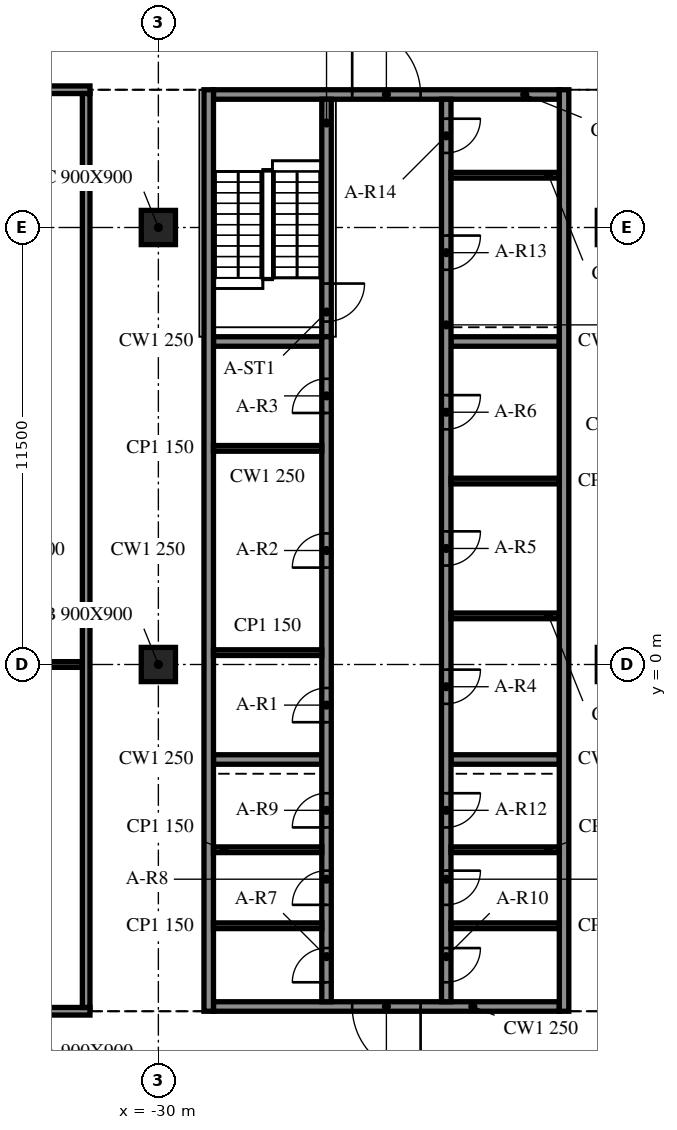
"""IFC4 building model, lengths in metres.
Left out: names, types, materials, properties, quantities, classifications, styles, units other than length and angle.
Written with IfcOpenShell. Run it as: python <this file> out.ifc"""

import sys

from ifc_helpers import new_model, si_unit, direction, frame, frame_2d, origin, origin_2d, place, context, subcontext, project, spatial, rectangle, extrude, element, fill, save


model = new_model("IFC4")
c1 = context("Model", 3, precision=1e-05, world=origin(), true_north=direction((0.0, 1.0)))
c2 = subcontext(c1, "Body", "Model", "MODEL_VIEW")
j1 = project(units=[si_unit("LENGTHUNIT", "METRE"), si_unit("PLANEANGLEUNIT", "RADIAN")], contexts=[c1])
p1 = place(None, origin())
s1 = spatial("IfcSite", under=j1, at=p1, CompositionType="ELEMENT")
p2 = place(p1, origin())
s2 = spatial("IfcBuilding", under=s1, at=p2, CompositionType="ELEMENT")
p3 = place(p2, frame((0.0, 0.0, 282.3)))
s3 = spatial("IfcBuildingStorey", under=s2, at=p3, CompositionType="ELEMENT", Elevation=282.3)
for number, where, z_axis, x_axis in (
    (1, (-30.0, 0.0, -0.34), (0.0, 0.0, 1.0), (1.0, 0.0, 0.0)),
    (2, (-30.0, 11.5, -0.34), (0.0, 0.0, 1.0), (1.0, 0.0, 0.0)),
):
    element("IfcColumn", number, at=place(p3, frame(where, z_axis=z_axis, x_axis=x_axis)), inside=s3, PredefinedType="COLUMN", context=c2, shape_type="SweptSolid", body=[
        extrude(rectangle(XDim=0.9, YDim=0.9, at=origin_2d()), origin(), (0.0, 0.0, 1.0), 7.34),
    ])
for number, where, z_axis, x_axis in (
    (3, (-28.675, 15.125, 0.0), (0.0, 0.0, 1.0), (0.0, -1.0, 0.0)),
    (4, (-19.325, -9.125, 0.0), (0.0, 0.0, 1.0), (0.0, 1.0, 0.0)),
):
    element("IfcWall", number, at=place(p3, frame(where, z_axis=z_axis, x_axis=x_axis)), inside=s3, PredefinedType="SOLIDWALL", context=c2, shape_type="SweptSolid", body=[
        extrude(rectangle(XDim=24.25, YDim=0.25, at=frame_2d((12.125, 0.0))), origin(), (0.0, 0.0, 1.0), 3.46),
    ])
p4 = place(p3, frame((-19.45, -9.0, 0.0), z_axis=(0.0, 0.0, 1.0), x_axis=(-1.0, 0.0, 0.0)))
e5 = element("IfcWall", 5, at=p4, inside=s3, PredefinedType="SOLIDWALL", context=c2, shape_type="SweptSolid", body=[
    extrude(rectangle(XDim=9.1, YDim=0.25, at=frame_2d((4.55, 0.0))), origin(), (0.0, 0.0, 1.0), 3.46),
])
p5 = place(p4, frame((3.65, 0.0, 0.0)))
e6 = element("IfcOpeningElement", 6, at=p5, cuts=e5, PredefinedType="OPENING", context=c2, shape_type="SweptSolid", body=[
    extrude(rectangle(XDim=1.8, YDim=2.1, at=frame_2d((0.9, 1.05))), frame((0.0, 0.135, 0.0), z_axis=(0.0, -1.0, 0.0), x_axis=(1.0, 0.0, 0.0)), (0.0, 0.0, 1.0), 0.27),
])
p6 = place(p3, frame((-28.55, 15.0, 0.0), z_axis=(0.0, 0.0, 1.0), x_axis=(1.0, 0.0, 0.0)))
e7 = element("IfcWall", 7, at=p6, inside=s3, PredefinedType="SOLIDWALL", context=c2, shape_type="SweptSolid", body=[
    extrude(rectangle(XDim=9.1, YDim=0.25, at=frame_2d((4.55, 0.0))), origin(), (0.0, 0.0, 1.0), 3.46),
])
p7 = place(p6, frame((3.65, 0.0, 0.0)))
e8 = element("IfcOpeningElement", 8, at=p7, cuts=e7, PredefinedType="OPENING", context=c2, shape_type="SweptSolid", body=[
    extrude(rectangle(XDim=1.8, YDim=2.1, at=frame_2d((0.9, 1.05))), frame((0.0, 0.135, 0.0), z_axis=(0.0, -1.0, 0.0), x_axis=(1.0, 0.0, 0.0)), (0.0, 0.0, 1.0), 0.27),
])
p8 = place(p3, frame((-25.575, -8.875, 0.0), z_axis=(0.0, 0.0, 1.0), x_axis=(0.0, 1.0, 0.0)))
e9 = element("IfcWall", 9, at=p8, inside=s3, PredefinedType="SOLIDWALL", context=c2, shape_type="SweptSolid", body=[
    extrude(rectangle(XDim=17.5, YDim=0.25, at=frame_2d((8.75, 0.0))), origin(), (0.0, 0.0, 1.0), 3.46),
])
p9 = place(p8, frame((7.356, 0.0, 0.0)))
e10 = element("IfcOpeningElement", 10, at=p9, cuts=e9, PredefinedType="OPENING", context=c2, shape_type="SweptSolid", body=[
    extrude(rectangle(XDim=0.9, YDim=2.1, at=frame_2d((0.45, 1.05))), frame((0.0, 0.135, 0.0), z_axis=(0.0, -1.0, 0.0), x_axis=(1.0, 0.0, 0.0)), (0.0, 0.0, 1.0), 0.27),
])
p10 = place(p8, frame((11.425, 0.0, 0.0)))
e11 = element("IfcOpeningElement", 11, at=p10, cuts=e9, PredefinedType="OPENING", context=c2, shape_type="SweptSolid", body=[
    extrude(rectangle(XDim=0.9, YDim=2.1, at=frame_2d((0.45, 1.05))), frame((0.0, 0.135, 0.0), z_axis=(0.0, -1.0, 0.0), x_axis=(1.0, 0.0, 0.0)), (0.0, 0.0, 1.0), 0.27),
])
p11 = place(p8, frame((15.494, 0.0, 0.0)))
e12 = element("IfcOpeningElement", 12, at=p11, cuts=e9, PredefinedType="OPENING", context=c2, shape_type="SweptSolid", body=[
    extrude(rectangle(XDim=0.9, YDim=2.1, at=frame_2d((0.45, 1.05))), frame((0.0, 0.135, 0.0), z_axis=(0.0, -1.0, 0.0), x_axis=(1.0, 0.0, 0.0)), (0.0, 0.0, 1.0), 0.27),
])
p12 = place(p8, frame((0.512, 0.0, 0.0)))
e13 = element("IfcOpeningElement", 13, at=p12, cuts=e9, PredefinedType="OPENING", context=c2, shape_type="SweptSolid", body=[
    extrude(rectangle(XDim=0.9, YDim=2.1, at=frame_2d((0.45, 1.05))), frame((0.0, 0.135, 0.0), z_axis=(0.0, -1.0, 0.0), x_axis=(1.0, 0.0, 0.0)), (0.0, 0.0, 1.0), 0.27),
])
p13 = place(p8, frame((2.55, 0.0, 0.0)))
e14 = element("IfcOpeningElement", 14, at=p13, cuts=e9, PredefinedType="OPENING", context=c2, shape_type="SweptSolid", body=[
    extrude(rectangle(XDim=0.9, YDim=2.1, at=frame_2d((0.45, 1.05))), frame((0.0, 0.135, 0.0), z_axis=(0.0, -1.0, 0.0), x_axis=(1.0, 0.0, 0.0)), (0.0, 0.0, 1.0), 0.27),
])
p14 = place(p8, frame((4.587, 0.0, 0.0)))
e15 = element("IfcOpeningElement", 15, at=p14, cuts=e9, PredefinedType="OPENING", context=c2, shape_type="SweptSolid", body=[
    extrude(rectangle(XDim=0.9, YDim=2.1, at=frame_2d((0.45, 1.05))), frame((0.0, 0.135, 0.0), z_axis=(0.0, -1.0, 0.0), x_axis=(1.0, 0.0, 0.0)), (0.0, 0.0, 1.0), 0.27),
])
p15 = place(p3, frame((-25.575, 14.875, 0.0), z_axis=(0.0, 0.0, 1.0), x_axis=(0.0, -1.0, 0.0)))
e16 = element("IfcWall", 16, at=p15, inside=s3, PredefinedType="SOLIDWALL", context=c2, shape_type="SweptSolid", body=[
    extrude(rectangle(XDim=6.25, YDim=0.25, at=frame_2d((3.125, 0.0))), origin(), (0.0, 0.0, 1.0), 3.46),
])
p16 = place(p15, frame((4.85, 0.0, 0.0)))
e17 = element("IfcOpeningElement", 17, at=p16, cuts=e16, PredefinedType="OPENING", context=c2, shape_type="SweptSolid", body=[
    extrude(rectangle(XDim=1.0, YDim=2.1, at=frame_2d((0.5, 1.05))), frame((0.0, 0.135, 0.0), z_axis=(0.0, -1.0, 0.0), x_axis=(1.0, 0.0, 0.0)), (0.0, 0.0, 1.0), 0.27),
])
p17 = place(p3, frame((-22.425, 14.875, 0.0), z_axis=(0.0, 0.0, 1.0), x_axis=(0.0, -1.0, 0.0)))
e18 = element("IfcWall", 18, at=p17, inside=s3, PredefinedType="SOLIDWALL", context=c2, shape_type="SweptSolid", body=[
    extrude(rectangle(XDim=23.75, YDim=0.25, at=frame_2d((11.875, 0.0))), origin(), (0.0, 0.0, 1.0), 3.46),
])
p18 = place(p17, frame((15.01, 0.0, 0.0)))
e19 = element("IfcOpeningElement", 19, at=p18, cuts=e18, PredefinedType="OPENING", context=c2, shape_type="SweptSolid", body=[
    extrude(rectangle(XDim=0.9, YDim=2.1, at=frame_2d((0.45, 1.05))), frame((0.0, 0.135, 0.0), z_axis=(0.0, -1.0, 0.0), x_axis=(1.0, 0.0, 0.0)), (0.0, 0.0, 1.0), 0.27),
])
p19 = place(p17, frame((11.371, 0.0, 0.0)))
e20 = element("IfcOpeningElement", 20, at=p19, cuts=e18, PredefinedType="OPENING", context=c2, shape_type="SweptSolid", body=[
    extrude(rectangle(XDim=0.9, YDim=2.1, at=frame_2d((0.45, 1.05))), frame((0.0, 0.135, 0.0), z_axis=(0.0, -1.0, 0.0), x_axis=(1.0, 0.0, 0.0)), (0.0, 0.0, 1.0), 0.27),
])
p20 = place(p17, frame((7.786, 0.0, 0.0)))
e21 = element("IfcOpeningElement", 21, at=p20, cuts=e18, PredefinedType="OPENING", context=c2, shape_type="SweptSolid", body=[
    extrude(rectangle(XDim=0.9, YDim=2.1, at=frame_2d((0.45, 1.05))), frame((0.0, 0.135, 0.0), z_axis=(0.0, -1.0, 0.0), x_axis=(1.0, 0.0, 0.0)), (0.0, 0.0, 1.0), 0.27),
])
p21 = place(p17, frame((22.337, 0.0, 0.0)))
e22 = element("IfcOpeningElement", 22, at=p21, cuts=e18, PredefinedType="OPENING", context=c2, shape_type="SweptSolid", body=[
    extrude(rectangle(XDim=0.9, YDim=2.1, at=frame_2d((0.45, 1.05))), frame((0.0, 0.135, 0.0), z_axis=(0.0, -1.0, 0.0), x_axis=(1.0, 0.0, 0.0)), (0.0, 0.0, 1.0), 0.27),
])
p22 = place(p17, frame((20.3, 0.0, 0.0)))
e23 = element("IfcOpeningElement", 23, at=p22, cuts=e18, PredefinedType="OPENING", context=c2, shape_type="SweptSolid", body=[
    extrude(rectangle(XDim=0.9, YDim=2.1, at=frame_2d((0.45, 1.05))), frame((0.0, 0.135, 0.0), z_axis=(0.0, -1.0, 0.0), x_axis=(1.0, 0.0, 0.0)), (0.0, 0.0, 1.0), 0.27),
])
p23 = place(p17, frame((18.262, 0.0, 0.0)))
e24 = element("IfcOpeningElement", 24, at=p23, cuts=e18, PredefinedType="OPENING", context=c2, shape_type="SweptSolid", body=[
    extrude(rectangle(XDim=0.9, YDim=2.1, at=frame_2d((0.45, 1.05))), frame((0.0, 0.135, 0.0), z_axis=(0.0, -1.0, 0.0), x_axis=(1.0, 0.0, 0.0)), (0.0, 0.0, 1.0), 0.27),
])
p24 = place(p17, frame((3.587, 0.0, 0.0)))
e25 = element("IfcOpeningElement", 25, at=p24, cuts=e18, PredefinedType="OPENING", context=c2, shape_type="SweptSolid", body=[
    extrude(rectangle(XDim=0.9, YDim=2.1, at=frame_2d((0.45, 1.05))), frame((0.0, 0.135, 0.0), z_axis=(0.0, -1.0, 0.0), x_axis=(1.0, 0.0, 0.0)), (0.0, 0.0, 1.0), 0.27),
])
p25 = place(p17, frame((0.512, 0.0, 0.0)))
e26 = element("IfcOpeningElement", 26, at=p25, cuts=e18, PredefinedType="OPENING", context=c2, shape_type="SweptSolid", body=[
    extrude(rectangle(XDim=0.9, YDim=2.1, at=frame_2d((0.45, 1.05))), frame((0.0, 0.135, 0.0), z_axis=(0.0, -1.0, 0.0), x_axis=(1.0, 0.0, 0.0)), (0.0, 0.0, 1.0), 0.27),
])
for number, where, z_axis, x_axis in (
    (27, (-28.55, -2.5, 0.0), (0.0, 0.0, 1.0), (1.0, 0.0, 0.0)),
    (28, (-28.55, 8.5, 0.0), (0.0, 0.0, 1.0), (1.0, 0.0, 0.0)),
    (29, (-22.3, -2.5, 0.0), (0.0, 0.0, 1.0), (1.0, 0.0, 0.0)),
    (30, (-22.3, 8.5, 0.0), (0.0, 0.0, 1.0), (1.0, 0.0, 0.0)),
):
    element("IfcWall", number, at=place(p3, frame(where, z_axis=z_axis, x_axis=x_axis)), inside=s3, PredefinedType="SOLIDWALL", context=c2, shape_type="SweptSolid", body=[
        extrude(rectangle(XDim=2.85, YDim=0.25, at=frame_2d((1.425, 0.0))), origin(), (0.0, 0.0, 1.0), 3.46),
    ])
for number, where, z_axis, x_axis in (
    (31, (-28.55, 0.312, 0.0), (0.0, 0.0, 1.0), (1.0, 0.0, 0.0)),
    (32, (-28.55, 5.688, 0.0), (0.0, 0.0, 1.0), (1.0, 0.0, 0.0)),
    (33, (-22.3, 1.28, 0.0), (0.0, 0.0, 1.0), (1.0, 0.0, 0.0)),
    (34, (-22.3, 4.827, 0.0), (0.0, 0.0, 1.0), (1.0, 0.0, 0.0)),
    (35, (-28.55, -6.875, 0.0), (0.0, 0.0, 1.0), (1.0, 0.0, 0.0)),
    (36, (-28.55, -4.875, 0.0), (0.0, 0.0, 1.0), (1.0, 0.0, 0.0)),
    (37, (-22.3, -6.875, 0.0), (0.0, 0.0, 1.0), (1.0, 0.0, 0.0)),
    (38, (-22.3, -4.875, 0.0), (0.0, 0.0, 1.0), (1.0, 0.0, 0.0)),
    (39, (-22.3, 12.875, 0.0), (0.0, 0.0, 1.0), (1.0, 0.0, 0.0)),
):
    element("IfcWall", number, at=place(p3, frame(where, z_axis=z_axis, x_axis=x_axis)), inside=s3, PredefinedType="PARTITIONING", context=c2, shape_type="SweptSolid", body=[
        extrude(rectangle(XDim=2.85, YDim=0.15, at=frame_2d((1.425, 0.0))), origin(), (0.0, 0.0, 1.0), 3.46),
    ])
p26 = place(p3, frame((-47.014, -9.125, 0.0), z_axis=(0.0, 0.0, 1.0), x_axis=(1.0, 0.0, 0.0)))
e40 = element("IfcWall", 40, at=p26, inside=s3, PredefinedType="PARTITIONING", context=c2, shape_type="SweptSolid", body=[
    extrude(rectangle(XDim=15.214, YDim=0.2, at=frame_2d((7.607, 0.0))), origin(), (0.0, 0.0, 1.0), 3.4),
])
p27 = place(p26, frame((7.1, 0.0, 0.0)))
e41 = element("IfcOpeningElement", 41, at=p27, cuts=e40, PredefinedType="OPENING", context=c2, shape_type="SweptSolid", body=[
    extrude(rectangle(XDim=1.2, YDim=2.1, at=frame_2d((0.6, 1.05))), frame((0.0, 0.11, 0.0), z_axis=(0.0, -1.0, 0.0), x_axis=(1.0, 0.0, 0.0)), (0.0, 0.0, 1.0), 0.22),
])
p28 = place(p3, frame((-41.55, 0.0, 0.0), z_axis=(0.0, 0.0, 1.0), x_axis=(1.0, 0.0, 0.0)))
e42 = element("IfcWall", 42, at=p28, inside=s3, PredefinedType="PARTITIONING", context=c2, shape_type="SweptSolid", body=[
    extrude(rectangle(XDim=9.55, YDim=0.15, at=frame_2d((4.775, 0.0))), origin(), (0.0, 0.0, 1.0), 3.4),
])
p29 = place(p3, frame((-47.975, 15.125, 0.0), z_axis=(0.0, 0.0, 1.0), x_axis=(1.0, 0.0, 0.0)))
e43 = element("IfcWall", 43, at=p29, inside=s3, PredefinedType="PARTITIONING", context=c2, shape_type="SweptSolid", body=[
    extrude(rectangle(XDim=16.175, YDim=0.2, at=frame_2d((8.087, 0.0))), origin(), (0.0, 0.0, 1.0), 3.4),
])
p30 = place(p29, frame((7.5, 0.0, 0.0)))
e44 = element("IfcOpeningElement", 44, at=p30, cuts=e43, PredefinedType="OPENING", context=c2, shape_type="SweptSolid", body=[
    extrude(rectangle(XDim=1.2, YDim=2.1, at=frame_2d((0.6, 1.05))), frame((0.0, 0.11, 0.0), z_axis=(0.0, -1.0, 0.0), x_axis=(1.0, 0.0, 0.0)), (0.0, 0.0, 1.0), 0.22),
])
p31 = place(p3, frame((-31.9, -9.025, 0.0), z_axis=(0.0, 0.0, 1.0), x_axis=(0.0, 1.0, 0.0)))
e45 = element("IfcWall", 45, at=p31, inside=s3, PredefinedType="PARTITIONING", context=c2, shape_type="SweptSolid", body=[
    extrude(rectangle(XDim=24.05, YDim=0.2, at=frame_2d((12.025, 0.0))), origin(), (0.0, 0.0, 1.0), 3.4),
])
p32 = place(p5, origin())
e46 = element("IfcDoor", 46, at=p32, inside=s3, OperationType="DOUBLE_DOOR_SINGLE_SWING", PredefinedType="DOOR", context=c2, shape_type="SweptSolid", body=[
    extrude(rectangle(XDim=1.8, YDim=2.1, at=frame_2d((0.9, 1.05))), frame((0.0, 0.025, 0.0), z_axis=(0.0, -1.0, 0.0), x_axis=(1.0, 0.0, 0.0)), (0.0, 0.0, 1.0), 0.05),
])
fill(e6, e46)
p33 = place(p7, origin())
e47 = element("IfcDoor", 47, at=p33, inside=s3, OperationType="DOUBLE_DOOR_SINGLE_SWING", PredefinedType="DOOR", context=c2, shape_type="SweptSolid", body=[
    extrude(rectangle(XDim=1.8, YDim=2.1, at=frame_2d((0.9, 1.05))), frame((0.0, 0.025, 0.0), z_axis=(0.0, -1.0, 0.0), x_axis=(1.0, 0.0, 0.0)), (0.0, 0.0, 1.0), 0.05),
])
fill(e8, e47)
p34 = place(p9, origin())
e48 = element("IfcDoor", 48, at=p34, inside=s3, OperationType="SINGLE_SWING_LEFT", PredefinedType="DOOR", context=c2, shape_type="SweptSolid", body=[
    extrude(rectangle(XDim=0.9, YDim=2.1, at=frame_2d((0.45, 1.05))), frame((0.0, 0.025, 0.0), z_axis=(0.0, -1.0, 0.0), x_axis=(1.0, 0.0, 0.0)), (0.0, 0.0, 1.0), 0.05),
])
fill(e10, e48)
p35 = place(p10, origin())
e49 = element("IfcDoor", 49, at=p35, inside=s3, OperationType="SINGLE_SWING_RIGHT", PredefinedType="DOOR", context=c2, shape_type="SweptSolid", body=[
    extrude(rectangle(XDim=0.9, YDim=2.1, at=frame_2d((0.45, 1.05))), frame((0.0, 0.025, 0.0), z_axis=(0.0, -1.0, 0.0), x_axis=(1.0, 0.0, 0.0)), (0.0, 0.0, 1.0), 0.05),
])
fill(e11, e49)
p36 = place(p11, origin())
e50 = element("IfcDoor", 50, at=p36, inside=s3, OperationType="SINGLE_SWING_LEFT", PredefinedType="DOOR", context=c2, shape_type="SweptSolid", body=[
    extrude(rectangle(XDim=0.9, YDim=2.1, at=frame_2d((0.45, 1.05))), frame((0.0, 0.025, 0.0), z_axis=(0.0, -1.0, 0.0), x_axis=(1.0, 0.0, 0.0)), (0.0, 0.0, 1.0), 0.05),
])
fill(e12, e50)
p37 = place(p18, origin())
e51 = element("IfcDoor", 51, at=p37, inside=s3, OperationType="SINGLE_SWING_RIGHT", PredefinedType="DOOR", context=c2, shape_type="SweptSolid", body=[
    extrude(rectangle(XDim=0.9, YDim=2.1, at=frame_2d((0.45, 1.05))), frame((0.0, 0.025, 0.0), z_axis=(0.0, -1.0, 0.0), x_axis=(1.0, 0.0, 0.0)), (0.0, 0.0, 1.0), 0.05),
])
fill(e19, e51)
p38 = place(p19, origin())
e52 = element("IfcDoor", 52, at=p38, inside=s3, OperationType="SINGLE_SWING_LEFT", PredefinedType="DOOR", context=c2, shape_type="SweptSolid", body=[
    extrude(rectangle(XDim=0.9, YDim=2.1, at=frame_2d((0.45, 1.05))), frame((0.0, 0.025, 0.0), z_axis=(0.0, -1.0, 0.0), x_axis=(1.0, 0.0, 0.0)), (0.0, 0.0, 1.0), 0.05),
])
fill(e20, e52)
p39 = place(p20, origin())
e53 = element("IfcDoor", 53, at=p39, inside=s3, OperationType="SINGLE_SWING_RIGHT", PredefinedType="DOOR", context=c2, shape_type="SweptSolid", body=[
    extrude(rectangle(XDim=0.9, YDim=2.1, at=frame_2d((0.45, 1.05))), frame((0.0, 0.025, 0.0), z_axis=(0.0, -1.0, 0.0), x_axis=(1.0, 0.0, 0.0)), (0.0, 0.0, 1.0), 0.05),
])
fill(e21, e53)
p40 = place(p12, origin())
e54 = element("IfcDoor", 54, at=p40, inside=s3, OperationType="SINGLE_SWING_LEFT", PredefinedType="DOOR", context=c2, shape_type="SweptSolid", body=[
    extrude(rectangle(XDim=0.9, YDim=2.1, at=frame_2d((0.45, 1.05))), frame((0.0, 0.025, 0.0), z_axis=(0.0, -1.0, 0.0), x_axis=(1.0, 0.0, 0.0)), (0.0, 0.0, 1.0), 0.05),
])
fill(e13, e54)
p41 = place(p13, origin())
e55 = element("IfcDoor", 55, at=p41, inside=s3, OperationType="SINGLE_SWING_RIGHT", PredefinedType="DOOR", context=c2, shape_type="SweptSolid", body=[
    extrude(rectangle(XDim=0.9, YDim=2.1, at=frame_2d((0.45, 1.05))), frame((0.0, 0.025, 0.0), z_axis=(0.0, -1.0, 0.0), x_axis=(1.0, 0.0, 0.0)), (0.0, 0.0, 1.0), 0.05),
])
fill(e14, e55)
p42 = place(p14, origin())
e56 = element("IfcDoor", 56, at=p42, inside=s3, OperationType="SINGLE_SWING_LEFT", PredefinedType="DOOR", context=c2, shape_type="SweptSolid", body=[
    extrude(rectangle(XDim=0.9, YDim=2.1, at=frame_2d((0.45, 1.05))), frame((0.0, 0.025, 0.0), z_axis=(0.0, -1.0, 0.0), x_axis=(1.0, 0.0, 0.0)), (0.0, 0.0, 1.0), 0.05),
])
fill(e15, e56)
p43 = place(p21, origin())
e57 = element("IfcDoor", 57, at=p43, inside=s3, OperationType="SINGLE_SWING_RIGHT", PredefinedType="DOOR", context=c2, shape_type="SweptSolid", body=[
    extrude(rectangle(XDim=0.9, YDim=2.1, at=frame_2d((0.45, 1.05))), frame((0.0, 0.025, 0.0), z_axis=(0.0, -1.0, 0.0), x_axis=(1.0, 0.0, 0.0)), (0.0, 0.0, 1.0), 0.05),
])
fill(e22, e57)
p44 = place(p22, origin())
e58 = element("IfcDoor", 58, at=p44, inside=s3, OperationType="SINGLE_SWING_LEFT", PredefinedType="DOOR", context=c2, shape_type="SweptSolid", body=[
    extrude(rectangle(XDim=0.9, YDim=2.1, at=frame_2d((0.45, 1.05))), frame((0.0, 0.025, 0.0), z_axis=(0.0, -1.0, 0.0), x_axis=(1.0, 0.0, 0.0)), (0.0, 0.0, 1.0), 0.05),
])
fill(e23, e58)
p45 = place(p23, origin())
e59 = element("IfcDoor", 59, at=p45, inside=s3, OperationType="SINGLE_SWING_RIGHT", PredefinedType="DOOR", context=c2, shape_type="SweptSolid", body=[
    extrude(rectangle(XDim=0.9, YDim=2.1, at=frame_2d((0.45, 1.05))), frame((0.0, 0.025, 0.0), z_axis=(0.0, -1.0, 0.0), x_axis=(1.0, 0.0, 0.0)), (0.0, 0.0, 1.0), 0.05),
])
fill(e24, e59)
p46 = place(p24, origin())
e60 = element("IfcDoor", 60, at=p46, inside=s3, OperationType="SINGLE_SWING_LEFT", PredefinedType="DOOR", context=c2, shape_type="SweptSolid", body=[
    extrude(rectangle(XDim=0.9, YDim=2.1, at=frame_2d((0.45, 1.05))), frame((0.0, 0.025, 0.0), z_axis=(0.0, -1.0, 0.0), x_axis=(1.0, 0.0, 0.0)), (0.0, 0.0, 1.0), 0.05),
])
fill(e25, e60)
p47 = place(p25, origin())
e61 = element("IfcDoor", 61, at=p47, inside=s3, OperationType="SINGLE_SWING_RIGHT", PredefinedType="DOOR", context=c2, shape_type="SweptSolid", body=[
    extrude(rectangle(XDim=0.9, YDim=2.1, at=frame_2d((0.45, 1.05))), frame((0.0, 0.025, 0.0), z_axis=(0.0, -1.0, 0.0), x_axis=(1.0, 0.0, 0.0)), (0.0, 0.0, 1.0), 0.05),
])
fill(e26, e61)
p48 = place(p16, origin())
e62 = element("IfcDoor", 62, at=p48, inside=s3, OperationType="SINGLE_SWING_LEFT", PredefinedType="DOOR", context=c2, shape_type="SweptSolid", body=[
    extrude(rectangle(XDim=1.0, YDim=2.1, at=frame_2d((0.5, 1.05))), frame((0.0, 0.025, 0.0), z_axis=(0.0, -1.0, 0.0), x_axis=(1.0, 0.0, 0.0)), (0.0, 0.0, 1.0), 0.05),
])
fill(e17, e62)
save(model, sys.argv[1])
